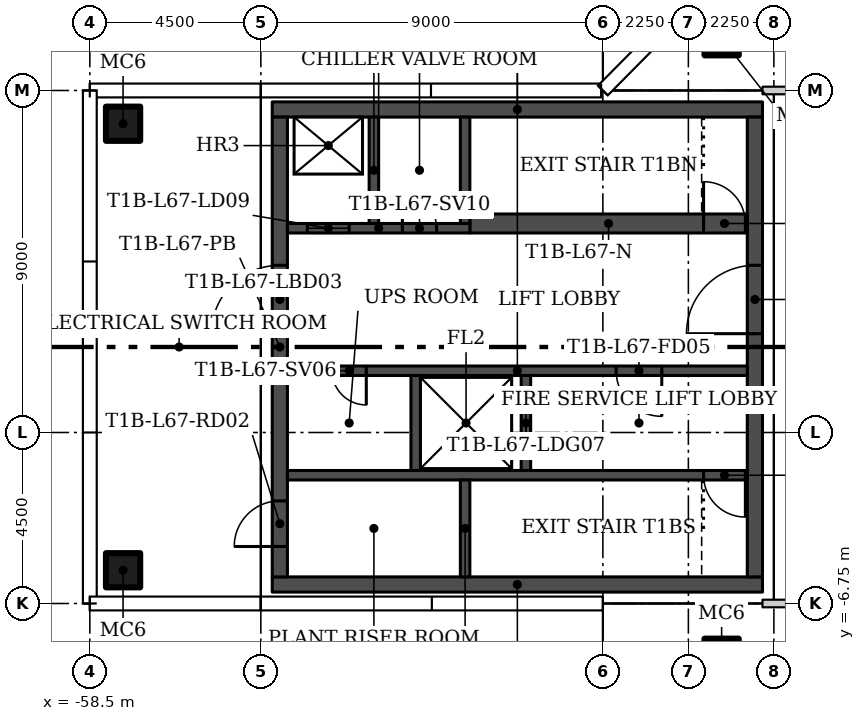
"""IFC4 building model, lengths in metres.
Left out: names, types, materials, properties, quantities, classifications, styles, units other than length and angle.
Written with IfcOpenShell. Run it as: python <this file> out.ifc"""

import sys

from ifc_helpers import new_model, si_unit, direction, frame, frame_2d, origin, origin_2d, place, context, subcontext, project, spatial, rectangle, hollow_rectangle, extrude, element, fill, save


model = new_model("IFC4")
c1 = context("Model", 3, precision=1e-05, world=origin(), true_north=direction((0.0, 1.0)))
c2 = subcontext(c1, "Body", "Model", "MODEL_VIEW")
j1 = project(units=[si_unit("LENGTHUNIT", "METRE"), si_unit("PLANEANGLEUNIT", "RADIAN")], contexts=[c1])
p1 = place(None, origin())
s1 = spatial("IfcSite", under=j1, at=p1, CompositionType="ELEMENT")
p2 = place(p1, origin())
s2 = spatial("IfcBuilding", under=s1, at=p2, CompositionType="ELEMENT")
p3 = place(p2, frame((0.0, 0.0, 278.3)))
s3 = spatial("IfcBuildingStorey", under=s2, at=p3, CompositionType="ELEMENT", Elevation=278.3)
for number, where in (
    (1, (-41.875, 8.125, 0.0)),
    (2, (-41.875, -8.125, 0.0)),
    (3, (-57.625, -5.875, 0.0)),
    (4, (-57.625, 5.875, 0.0)),
):
    element("IfcColumn", number, at=place(p3, frame(where)), inside=s3, PredefinedType="COLUMN", context=c2, shape_type="SweptSolid", body=[
        extrude(hollow_rectangle(XDim=0.9, YDim=0.9, WallThickness=0.036, at=origin_2d()), origin(), (0.0, 0.0, 1.0), 5.55),
    ])
p4 = place(p3, frame((-40.8, 6.75, 0.0)))
e5 = element("IfcWall", 5, at=p4, inside=s3, PredefinedType="PARTITIONING", context=c2, shape_type="SweptSolid", body=[
    extrude(rectangle(XDim=3.15, YDim=0.2, at=frame_2d((1.575, 0.0))), origin(), (0.0, 0.0, 1.0), 5.55),
])
p5 = place(p3, frame((-37.65, -6.75, 0.0), z_axis=(0.0, 0.0, 1.0), x_axis=(-1.0, 0.0, 0.0)))
e6 = element("IfcWall", 6, at=p5, inside=s3, PredefinedType="PARTITIONING", context=c2, shape_type="SweptSolid", body=[
    extrude(rectangle(XDim=3.15, YDim=0.2, at=frame_2d((1.575, 0.0))), origin(), (0.0, 0.0, 1.0), 5.55),
])
for number, where, z_axis, x_axis in (
    (7, (-40.8, -6.25, 0.0), (0.0, 0.0, 1.0), (-1.0, 0.0, 0.0)),
    (8, (-40.8, 6.25, 0.0), (0.0, 0.0, 1.0), (-1.0, 0.0, 0.0)),
):
    element("IfcWall", number, at=place(p3, frame(where, z_axis=z_axis, x_axis=x_axis)), inside=s3, PredefinedType="SHEAR", context=c2, shape_type="SweptSolid", body=[
        extrude(rectangle(XDim=12.9, YDim=0.4, at=frame_2d((6.45, 0.0))), origin(), (0.0, 0.0, 1.0), 5.55),
    ])
p6 = place(p3, frame((-41.0, -6.05, 0.0), z_axis=(0.0, 0.0, 1.0), x_axis=(0.0, 1.0, 0.0)))
e9 = element("IfcWall", 9, at=p6, inside=s3, PredefinedType="SHEAR", context=c2, shape_type="SweptSolid", body=[
    extrude(rectangle(XDim=12.1, YDim=0.4, at=frame_2d((6.05, 0.0))), origin(), (0.0, 0.0, 1.0), 5.55),
])
p7 = place(p6, frame((6.4, 0.0, 0.0)))
e10 = element("IfcOpeningElement", 10, at=p7, cuts=e9, PredefinedType="OPENING", context=c2, shape_type="SweptSolid", body=[
    extrude(rectangle(XDim=1.8, YDim=2.4, at=frame_2d((0.9, 1.2))), frame((0.0, 0.21, 0.0), z_axis=(0.0, -1.0, 0.0), x_axis=(1.0, 0.0, 0.0)), (0.0, 0.0, 1.0), 0.42),
])
p8 = place(p3, frame((-53.5, -6.05, 0.0), z_axis=(0.0, 0.0, 1.0), x_axis=(0.0, 1.0, 0.0)))
e11 = element("IfcWall", 11, at=p8, inside=s3, PredefinedType="SHEAR", context=c2, shape_type="SweptSolid", body=[
    extrude(rectangle(XDim=12.1, YDim=0.4, at=frame_2d((6.05, 0.0))), origin(), (0.0, 0.0, 1.0), 5.55),
])
p9 = place(p8, frame((0.8, 0.0, 0.0)))
e12 = element("IfcOpeningElement", 12, at=p9, cuts=e11, PredefinedType="OPENING", context=c2, shape_type="SweptSolid", body=[
    extrude(rectangle(XDim=1.2, YDim=2.1, at=frame_2d((0.6, 1.05))), frame((0.0, 0.21, 0.0), z_axis=(0.0, -1.0, 0.0), x_axis=(1.0, 0.0, 0.0)), (0.0, 0.0, 1.0), 0.42),
])
p10 = place(p8, frame((6.4, 0.0, 0.0)))
e13 = element("IfcOpeningElement", 13, at=p10, cuts=e11, PredefinedType="OPENING", context=c2, shape_type="SweptSolid", body=[
    extrude(rectangle(XDim=1.8, YDim=2.4, at=frame_2d((0.9, 1.2))), frame((0.0, 0.21, 0.0), z_axis=(0.0, -1.0, 0.0), x_axis=(1.0, 0.0, 0.0)), (0.0, 0.0, 1.0), 0.42),
])
p11 = place(p3, frame((-41.2, -3.375, 0.0), z_axis=(0.0, 0.0, 1.0), x_axis=(-1.0, 0.0, 0.0)))
e14 = element("IfcWall", 14, at=p11, inside=s3, PredefinedType="SHEAR", context=c2, shape_type="SweptSolid", body=[
    extrude(rectangle(XDim=12.1, YDim=0.25, at=frame_2d((6.05, 0.0))), origin(), (0.0, 0.0, 1.0), 5.55),
])
p12 = place(p11, frame((0.05, 0.0, 0.0)))
e15 = element("IfcOpeningElement", 15, at=p12, cuts=e14, PredefinedType="OPENING", context=c2, shape_type="SweptSolid", body=[
    extrude(rectangle(XDim=1.1, YDim=2.1, at=frame_2d((0.55, 1.05))), frame((0.0, 0.135, 0.0), z_axis=(0.0, -1.0, 0.0), x_axis=(1.0, 0.0, 0.0)), (0.0, 0.0, 1.0), 0.27),
])
p13 = place(p3, frame((-48.625, -6.05, 0.0), z_axis=(0.0, 0.0, 1.0), x_axis=(0.0, 1.0, 0.0)))
e16 = element("IfcWall", 16, at=p13, inside=s3, PredefinedType="SHEAR", context=c2, shape_type="SweptSolid", body=[
    extrude(rectangle(XDim=2.55, YDim=0.25, at=frame_2d((1.275, 0.0))), origin(), (0.0, 0.0, 1.0), 5.55),
])
p14 = place(p3, frame((-41.2, -0.625, 0.0), z_axis=(0.0, 0.0, 1.0), x_axis=(-1.0, 0.0, 0.0)))
e17 = element("IfcWall", 17, at=p14, inside=s3, PredefinedType="SHEAR", context=c2, shape_type="SweptSolid", body=[
    extrude(rectangle(XDim=12.1, YDim=0.25, at=frame_2d((6.05, 0.0))), origin(), (0.0, 0.0, 1.0), 5.55),
])
p15 = place(p14, frame((2.25, 0.0, 0.0)))
e18 = element("IfcOpeningElement", 18, at=p15, cuts=e17, PredefinedType="OPENING", context=c2, shape_type="SweptSolid", body=[
    extrude(rectangle(XDim=1.2, YDim=2.1, at=frame_2d((0.6, 1.05))), frame((0.0, 0.135, 0.0), z_axis=(0.0, -1.0, 0.0), x_axis=(1.0, 0.0, 0.0)), (0.0, 0.0, 1.0), 0.27),
])
p16 = place(p14, frame((10.025, 0.0, 0.0)))
e19 = element("IfcOpeningElement", 19, at=p16, cuts=e17, PredefinedType="OPENING", context=c2, shape_type="SweptSolid", body=[
    extrude(rectangle(XDim=0.9, YDim=2.1, at=frame_2d((0.45, 1.05))), frame((0.0, 0.135, 0.0), z_axis=(0.0, -1.0, 0.0), x_axis=(1.0, 0.0, 0.0)), (0.0, 0.0, 1.0), 0.27),
])
p17 = place(p3, frame((-47.025, -3.25, 0.0), z_axis=(0.0, 0.0, 1.0), x_axis=(0.0, 1.0, 0.0)))
e20 = element("IfcWall", 20, at=p17, inside=s3, PredefinedType="SHEAR", context=c2, shape_type="SweptSolid", body=[
    extrude(rectangle(XDim=2.5, YDim=0.25, at=frame_2d((1.25, 0.0))), origin(), (0.0, 0.0, 1.0), 5.55),
])
p18 = place(p17, frame((0.55, 0.0, 0.0)))
e21 = element("IfcOpeningElement", 21, at=p18, cuts=e20, PredefinedType="OPENING", context=c2, shape_type="SweptSolid", body=[
    extrude(rectangle(XDim=1.4, YDim=2.4, at=frame_2d((0.7, 1.2))), frame((0.0, 0.135, 0.0), z_axis=(0.0, -1.0, 0.0), x_axis=(1.0, 0.0, 0.0)), (0.0, 0.0, 1.0), 0.27),
])
p19 = place(p3, frame((-49.925, -3.25, 0.0), z_axis=(0.0, 0.0, 1.0), x_axis=(0.0, 1.0, 0.0)))
e22 = element("IfcWall", 22, at=p19, inside=s3, PredefinedType="SHEAR", context=c2, shape_type="SweptSolid", body=[
    extrude(rectangle(XDim=2.5, YDim=0.25, at=frame_2d((1.25, 0.0))), origin(), (0.0, 0.0, 1.0), 5.55),
])
p20 = place(p3, frame((-48.5, 3.25, 0.0)))
e23 = element("IfcWall", 23, at=p20, inside=s3, PredefinedType="SHEAR", context=c2, shape_type="SweptSolid", body=[
    extrude(rectangle(XDim=7.3, YDim=0.5, at=frame_2d((3.65, 0.0))), origin(), (0.0, 0.0, 1.0), 5.55),
])
p21 = place(p20, frame((6.15, 0.0, 0.0)))
e24 = element("IfcOpeningElement", 24, at=p21, cuts=e23, PredefinedType="OPENING", context=c2, shape_type="SweptSolid", body=[
    extrude(rectangle(XDim=1.1, YDim=2.1, at=frame_2d((0.55, 1.05))), frame((0.0, 0.26, 0.0), z_axis=(0.0, -1.0, 0.0), x_axis=(1.0, 0.0, 0.0)), (0.0, 0.0, 1.0), 0.52),
])
p22 = place(p3, frame((-53.3, 3.125, 0.0)))
e25 = element("IfcWall", 25, at=p22, inside=s3, PredefinedType="SHEAR", context=c2, shape_type="SweptSolid", body=[
    extrude(rectangle(XDim=4.8, YDim=0.25, at=frame_2d((2.4, 0.0))), origin(), (0.0, 0.0, 1.0), 5.55),
])
p23 = place(p22, frame((0.525, 0.0, 0.0)))
e26 = element("IfcOpeningElement", 26, at=p23, cuts=e25, PredefinedType="OPENING", context=c2, shape_type="SweptSolid", body=[
    extrude(rectangle(XDim=1.1, YDim=2.1, at=frame_2d((0.55, 1.05))), frame((0.0, 0.135, 0.0), z_axis=(0.0, -1.0, 0.0), x_axis=(1.0, 0.0, 0.0)), (0.0, 0.0, 1.0), 0.27),
])
p24 = place(p22, frame((3.025, 0.0, 0.0)))
e27 = element("IfcOpeningElement", 27, at=p24, cuts=e25, PredefinedType="OPENING", context=c2, shape_type="SweptSolid", body=[
    extrude(rectangle(XDim=0.9, YDim=2.1, at=frame_2d((0.45, 1.05))), frame((0.0, 0.135, 0.0), z_axis=(0.0, -1.0, 0.0), x_axis=(1.0, 0.0, 0.0)), (0.0, 0.0, 1.0), 0.27),
])
for number, where, z_axis, x_axis in (
    (28, (-48.625, 3.25, 0.0), (0.0, 0.0, 1.0), (0.0, 1.0, 0.0)),
    (29, (-51.025, 3.25, 0.0), (0.0, 0.0, 1.0), (0.0, 1.0, 0.0)),
):
    element("IfcWall", number, at=place(p3, frame(where, z_axis=z_axis, x_axis=x_axis)), inside=s3, PredefinedType="SHEAR", context=c2, shape_type="SweptSolid", body=[
        extrude(rectangle(XDim=2.8, YDim=0.25, at=frame_2d((1.4, 0.0))), origin(), (0.0, 0.0, 1.0), 5.55),
    ])
p25 = place(p7, origin())
e30 = element("IfcDoor", 30, at=p25, inside=s3, OperationType="DOUBLE_DOOR_SINGLE_SWING", PredefinedType="DOOR", context=c2, shape_type="SweptSolid", body=[
    extrude(rectangle(XDim=1.8, YDim=2.4, at=frame_2d((0.9, 1.2))), frame((0.0, 0.025, 0.0), z_axis=(0.0, -1.0, 0.0), x_axis=(1.0, 0.0, 0.0)), (0.0, 0.0, 1.0), 0.05),
])
fill(e10, e30)
p26 = place(p9, origin())
e31 = element("IfcDoor", 31, at=p26, inside=s3, OperationType="SINGLE_SWING_LEFT", PredefinedType="DOOR", context=c2, shape_type="SweptSolid", body=[
    extrude(rectangle(XDim=1.2, YDim=2.1, at=frame_2d((0.6, 1.05))), frame((0.0, 0.025, 0.0), z_axis=(0.0, -1.0, 0.0), x_axis=(1.0, 0.0, 0.0)), (0.0, 0.0, 1.0), 0.05),
])
fill(e12, e31)
p27 = place(p10, origin())
e32 = element("IfcDoor", 32, at=p27, inside=s3, OperationType="DOUBLE_DOOR_SINGLE_SWING", PredefinedType="DOOR", context=c2, shape_type="SweptSolid", body=[
    extrude(rectangle(XDim=1.8, YDim=2.4, at=frame_2d((0.9, 1.2))), frame((0.0, 0.025, 0.0), z_axis=(0.0, -1.0, 0.0), x_axis=(1.0, 0.0, 0.0)), (0.0, 0.0, 1.0), 0.05),
])
fill(e13, e32)
p28 = place(p12, origin())
e33 = element("IfcDoor", 33, at=p28, inside=s3, OperationType="SINGLE_SWING_LEFT", PredefinedType="DOOR", context=c2, shape_type="SweptSolid", body=[
    extrude(rectangle(XDim=1.1, YDim=2.1, at=frame_2d((0.55, 1.05))), frame((0.0, 0.025, 0.0), z_axis=(0.0, -1.0, 0.0), x_axis=(1.0, 0.0, 0.0)), (0.0, 0.0, 1.0), 0.05),
])
fill(e15, e33)
p29 = place(p15, origin())
e34 = element("IfcDoor", 34, at=p29, inside=s3, OperationType="SINGLE_SWING_LEFT", PredefinedType="DOOR", context=c2, shape_type="SweptSolid", body=[
    extrude(rectangle(XDim=1.2, YDim=2.1, at=frame_2d((0.6, 1.05))), frame((0.0, 0.025, 0.0), z_axis=(0.0, -1.0, 0.0), x_axis=(1.0, 0.0, 0.0)), (0.0, 0.0, 1.0), 0.05),
])
fill(e18, e34)
p30 = place(p16, origin())
e35 = element("IfcDoor", 35, at=p30, inside=s3, OperationType="SINGLE_SWING_RIGHT", PredefinedType="DOOR", context=c2, shape_type="SweptSolid", body=[
    extrude(rectangle(XDim=0.9, YDim=2.1, at=frame_2d((0.45, 1.05))), frame((0.0, 0.025, 0.0), z_axis=(0.0, -1.0, 0.0), x_axis=(1.0, 0.0, 0.0)), (0.0, 0.0, 1.0), 0.05),
])
fill(e19, e35)
p31 = place(p18, origin())
e36 = element("IfcDoor", 36, at=p31, inside=s3, OperationType="SLIDING_TO_LEFT", PredefinedType="DOOR", context=c2, shape_type="SweptSolid", body=[
    extrude(rectangle(XDim=1.4, YDim=2.4, at=frame_2d((0.7, 1.2))), frame((0.0, 0.025, 0.0), z_axis=(0.0, -1.0, 0.0), x_axis=(1.0, 0.0, 0.0)), (0.0, 0.0, 1.0), 0.05),
])
fill(e21, e36)
p32 = place(p21, origin())
e37 = element("IfcDoor", 37, at=p32, inside=s3, OperationType="SINGLE_SWING_RIGHT", PredefinedType="DOOR", context=c2, shape_type="SweptSolid", body=[
    extrude(rectangle(XDim=1.1, YDim=2.1, at=frame_2d((0.55, 1.05))), frame((0.0, 0.025, 0.0), z_axis=(0.0, -1.0, 0.0), x_axis=(1.0, 0.0, 0.0)), (0.0, 0.0, 1.0), 0.05),
])
fill(e24, e37)
p33 = place(p23, origin())
e38 = element("IfcDoor", 38, at=p33, inside=s3, OperationType="SLIDING_TO_LEFT", PredefinedType="DOOR", context=c2, shape_type="SweptSolid", body=[
    extrude(rectangle(XDim=1.1, YDim=2.1, at=frame_2d((0.55, 1.05))), frame((0.0, 0.025, 0.0), z_axis=(0.0, -1.0, 0.0), x_axis=(1.0, 0.0, 0.0)), (0.0, 0.0, 1.0), 0.05),
])
fill(e26, e38)
p34 = place(p24, origin())
e39 = element("IfcDoor", 39, at=p34, inside=s3, OperationType="SINGLE_SWING_RIGHT", PredefinedType="DOOR", context=c2, shape_type="SweptSolid", body=[
    extrude(rectangle(XDim=0.9, YDim=2.1, at=frame_2d((0.45, 1.05))), frame((0.0, 0.025, 0.0), z_axis=(0.0, -1.0, 0.0), x_axis=(1.0, 0.0, 0.0)), (0.0, 0.0, 1.0), 0.05),
])
fill(e27, e39)
save(model, sys.argv[1])
